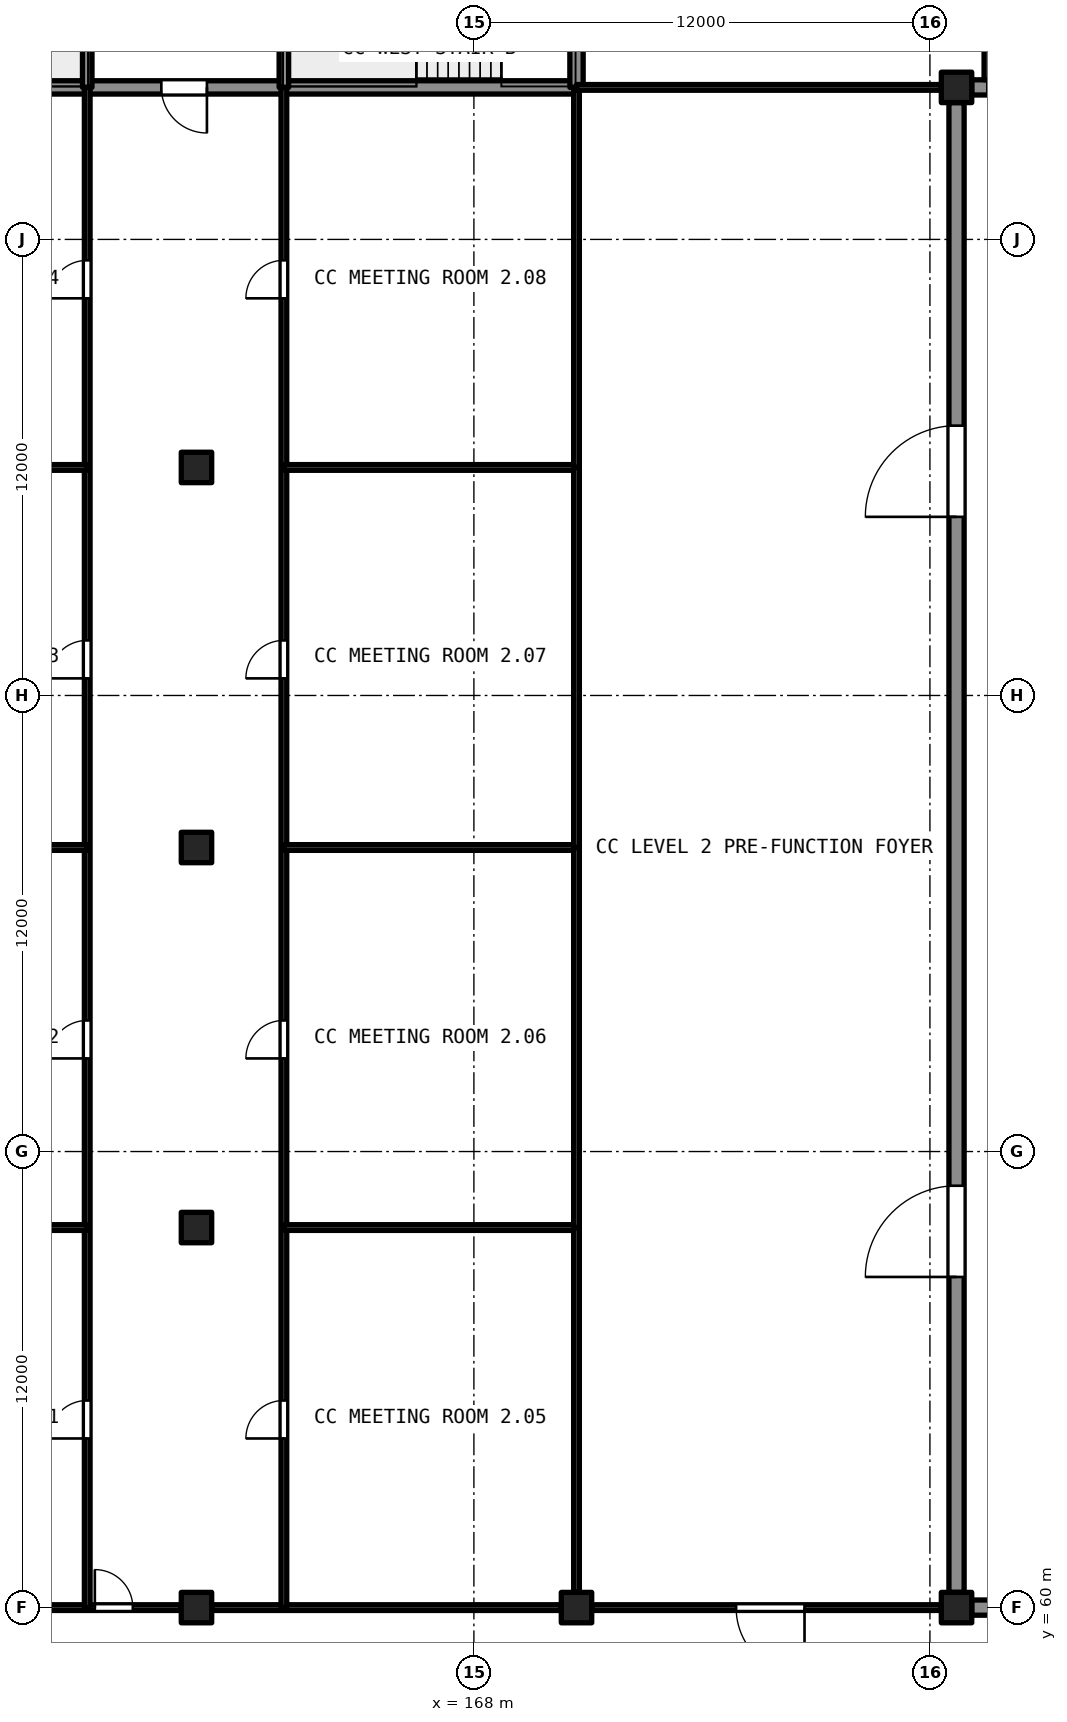
"""IFC4 building model, lengths in metres.
Left out: names, types, materials, properties, quantities, classifications, styles, units other than length and angle.
Written with IfcOpenShell. Run it as: python <this file> out.ifc"""

import sys

from ifc_helpers import new_model, si_unit, direction, frame, frame_2d, origin, origin_2d, place, context, subcontext, project, spatial, rectangle, extrude, element, fill, save


model = new_model("IFC4")
c1 = context("Model", 3, precision=1e-05, world=origin(), true_north=direction((0.0, 1.0)))
c2 = subcontext(c1, "Body", "Model", "MODEL_VIEW")
j1 = project(units=[si_unit("LENGTHUNIT", "METRE"), si_unit("PLANEANGLEUNIT", "RADIAN")], contexts=[c1])
p1 = place(None, origin())
s1 = spatial("IfcSite", under=j1, at=p1, CompositionType="ELEMENT")
p2 = place(p1, origin())
s2 = spatial("IfcBuilding", under=s1, at=p2, CompositionType="ELEMENT")
p3 = place(p2, frame((0.0, 0.0, 15.0)))
s3 = spatial("IfcBuildingStorey", under=s2, at=p3, CompositionType="ELEMENT", Elevation=15.0)
for number, where, z_axis, x_axis in (
    (1, (160.7, 60.0, 0.0), (0.0, 0.0, 1.0), (1.0, 0.0, 0.0)),
    (2, (160.7, 70.0, 0.0), (0.0, 0.0, 1.0), (1.0, 0.0, 0.0)),
    (3, (160.7, 80.0, 0.0), (0.0, 0.0, 1.0), (1.0, 0.0, 0.0)),
    (4, (160.7, 90.0, 0.0), (0.0, 0.0, 1.0), (1.0, 0.0, 0.0)),
    (5, (170.7, 60.0, 0.0), (0.0, 0.0, 1.0), (1.0, 0.0, 0.0)),
    (6, (180.7, 60.0, 0.0), (0.0, 0.0, 1.0), (1.0, 0.0, 0.0)),
    (7, (180.7, 100.0, 0.0), (0.0, 0.0, 1.0), (1.0, 0.0, 0.0)),
):
    element("IfcColumn", number, at=place(p3, frame(where, z_axis=z_axis, x_axis=x_axis)), inside=s3, PredefinedType="COLUMN", context=c2, shape_type="SweptSolid", body=[
        extrude(rectangle(XDim=0.8, YDim=0.8, at=origin_2d()), origin(), (0.0, 0.0, 1.0), 5.4),
    ])
p4 = place(p3, frame((180.7, 60.4, 0.0), z_axis=(0.0, 0.0, 1.0), x_axis=(0.0, 1.0, 0.0)))
e8 = element("IfcWall", 8, at=p4, inside=s3, PredefinedType="SHEAR", context=c2, shape_type="SweptSolid", body=[
    extrude(rectangle(XDim=39.2, YDim=0.4, at=frame_2d((19.6, 0.0))), origin(), (0.0, 0.0, 1.0), 5.4),
])
p5 = place(p4, frame((8.3, 0.0, 0.0)))
e9 = element("IfcOpeningElement", 9, at=p5, cuts=e8, PredefinedType="OPENING", context=c2, shape_type="SweptSolid", body=[
    extrude(rectangle(XDim=2.4, YDim=2.4, at=frame_2d((1.2, 1.2))), frame((0.0, 0.21, 0.0), z_axis=(0.0, -1.0, 0.0), x_axis=(1.0, 0.0, 0.0)), (0.0, 0.0, 1.0), 0.421),
])
p6 = place(p4, frame((28.3, 0.0, 0.0)))
e10 = element("IfcOpeningElement", 10, at=p6, cuts=e8, PredefinedType="OPENING", context=c2, shape_type="SweptSolid", body=[
    extrude(rectangle(XDim=2.4, YDim=2.4, at=frame_2d((1.2, 1.2))), frame((0.0, 0.21, 0.0), z_axis=(0.0, -1.0, 0.0), x_axis=(1.0, 0.0, 0.0)), (0.0, 0.0, 1.0), 0.421),
])
p7 = place(p3, frame((181.1, 60.0, 0.0), z_axis=(0.0, 0.0, 1.0), x_axis=(1.0, 0.0, 0.0)))
e11 = element("IfcWall", 11, at=p7, inside=s3, PredefinedType="SHEAR", context=c2, shape_type="SweptSolid", body=[
    extrude(rectangle(XDim=9.2, YDim=0.4, at=frame_2d((4.6, 0.0))), origin(), (0.0, 0.0, 1.0), 5.4),
])
p8 = place(p3, frame((181.1, 100.0, 0.0), z_axis=(0.0, 0.0, 1.0), x_axis=(1.0, 0.0, 0.0)))
e12 = element("IfcWall", 12, at=p8, inside=s3, PredefinedType="SHEAR", context=c2, shape_type="SweptSolid", body=[
    extrude(rectangle(XDim=0.45, YDim=0.4, at=frame_2d((0.225, 0.0))), origin(), (0.0, 0.0, 1.0), 5.4),
])
p9 = place(p3, frame((150.3, 100.0, 0.0), z_axis=(0.0, 0.0, 1.0), x_axis=(1.0, 0.0, 0.0)))
e13 = element("IfcWall", 13, at=p9, inside=s3, PredefinedType="SHEAR", context=c2, shape_type="SweptSolid", body=[
    extrude(rectangle(XDim=7.525, YDim=0.35, at=frame_2d((3.762, 0.0))), origin(), (0.0, 0.0, 1.0), 4.99),
])
p10 = place(p3, frame((163.0, 100.0, 0.0), z_axis=(0.0, 0.0, 1.0), x_axis=(-1.0, 0.0, 0.0)))
e14 = element("IfcWall", 14, at=p10, inside=s3, PredefinedType="SHEAR", context=c2, shape_type="SweptSolid", body=[
    extrude(rectangle(XDim=5.175, YDim=0.35, at=frame_2d((2.587, 0.0))), origin(), (0.0, 0.0, 1.0), 4.99),
])
p11 = place(p10, frame((2.025, 0.0, 0.0)))
e15 = element("IfcOpeningElement", 15, at=p11, cuts=e14, PredefinedType="OPENING", context=c2, shape_type="SweptSolid", body=[
    extrude(rectangle(XDim=1.2, YDim=2.1, at=frame_2d((0.6, 1.05))), frame((0.0, 0.186, 0.0), z_axis=(0.0, -1.0, 0.0), x_axis=(1.0, 0.0, 0.0)), (0.0, 0.0, 1.0), 0.371),
])
p12 = place(p3, frame((163.0, 100.0, 0.0), z_axis=(0.0, 0.0, 1.0), x_axis=(1.0, 0.0, 0.0)))
e16 = element("IfcWall", 16, at=p12, inside=s3, PredefinedType="SHEAR", context=c2, shape_type="SweptSolid", body=[
    extrude(rectangle(XDim=7.7, YDim=0.35, at=frame_2d((3.85, 0.0))), origin(), (0.0, 0.0, 1.0), 4.99),
])
p13 = place(p3, frame((170.7, 100.0, 0.0), z_axis=(0.0, 0.0, 1.0), x_axis=(0.0, 1.0, 0.0)))
e17 = element("IfcWall", 17, at=p13, inside=s3, PredefinedType="SHEAR", context=c2, shape_type="SweptSolid", body=[
    extrude(rectangle(XDim=3.15, YDim=0.35, at=frame_2d((1.575, 0.0))), origin(), (0.0, 0.0, 1.0), 4.99),
])
for number, where, z_axis, x_axis in (
    (18, (157.825, 100.0, 0.0), (0.0, 0.0, 1.0), (0.0, 1.0, 0.0)),
    (19, (163.0, 100.0, 0.0), (0.0, 0.0, 1.0), (0.0, 1.0, 0.0)),
):
    element("IfcWall", number, at=place(p3, frame(where, z_axis=z_axis, x_axis=x_axis)), inside=s3, PredefinedType="SHEAR", context=c2, shape_type="SweptSolid", body=[
        extrude(rectangle(XDim=3.15, YDim=0.25, at=frame_2d((1.575, 0.0))), origin(), (0.0, 0.0, 1.0), 4.99),
    ])
p14 = place(p3, frame((160.3, 60.0, 0.0), z_axis=(0.0, 0.0, 1.0), x_axis=(-1.0, 0.0, 0.0)))
e20 = element("IfcWall", 20, at=p14, inside=s3, PredefinedType="PARTITIONING", context=c2, shape_type="SweptSolid", body=[
    extrude(rectangle(XDim=9.2, YDim=0.15, at=frame_2d((4.6, 0.0))), origin(), (0.0, 0.0, 1.0), 4.99),
])
p15 = place(p14, frame((1.275, 0.0, 0.0)))
e21 = element("IfcOpeningElement", 21, at=p15, cuts=e20, PredefinedType="OPENING", context=c2, shape_type="SweptSolid", body=[
    extrude(rectangle(XDim=1.0, YDim=2.1, at=frame_2d((0.5, 1.05))), frame((0.0, 0.085, 0.0), z_axis=(0.0, -1.0, 0.0), x_axis=(1.0, 0.0, 0.0)), (0.0, 0.0, 1.0), 0.171),
])
p16 = place(p3, frame((161.1, 60.0, 0.0), z_axis=(0.0, 0.0, 1.0), x_axis=(1.0, 0.0, 0.0)))
e22 = element("IfcWall", 22, at=p16, inside=s3, PredefinedType="PARTITIONING", context=c2, shape_type="SweptSolid", body=[
    extrude(rectangle(XDim=9.2, YDim=0.15, at=frame_2d((4.6, 0.0))), origin(), (0.0, 0.0, 1.0), 4.99),
])
p17 = place(p3, frame((180.3, 60.0, 0.0), z_axis=(0.0, 0.0, 1.0), x_axis=(-1.0, 0.0, 0.0)))
e23 = element("IfcWall", 23, at=p17, inside=s3, PredefinedType="PARTITIONING", context=c2, shape_type="SweptSolid", body=[
    extrude(rectangle(XDim=9.2, YDim=0.15, at=frame_2d((4.6, 0.0))), origin(), (0.0, 0.0, 1.0), 4.99),
])
p18 = place(p17, frame((3.6, 0.0, 0.0)))
e24 = element("IfcOpeningElement", 24, at=p18, cuts=e23, PredefinedType="OPENING", context=c2, shape_type="SweptSolid", body=[
    extrude(rectangle(XDim=1.8, YDim=2.1, at=frame_2d((0.9, 1.05))), frame((0.0, 0.085, 0.0), z_axis=(0.0, -1.0, 0.0), x_axis=(1.0, 0.0, 0.0)), (0.0, 0.0, 1.0), 0.171),
])
p19 = place(p3, frame((157.825, 100.0, 0.0), z_axis=(0.0, 0.0, 1.0), x_axis=(0.0, -1.0, 0.0)))
e25 = element("IfcWall", 25, at=p19, inside=s3, PredefinedType="PARTITIONING", context=c2, shape_type="SweptSolid", body=[
    extrude(rectangle(XDim=40.0, YDim=0.15, at=frame_2d((20.0, 0.0))), origin(), (0.0, 0.0, 1.0), 4.99),
])
p20 = place(p19, frame((34.55, 0.0, 0.0)))
e26 = element("IfcOpeningElement", 26, at=p20, cuts=e25, PredefinedType="OPENING", context=c2, shape_type="SweptSolid", body=[
    extrude(rectangle(XDim=1.0, YDim=2.1, at=frame_2d((0.5, 1.05))), frame((0.0, 0.085, 0.0), z_axis=(0.0, -1.0, 0.0), x_axis=(1.0, 0.0, 0.0)), (0.0, 0.0, 1.0), 0.171),
])
p21 = place(p19, frame((24.55, 0.0, 0.0)))
e27 = element("IfcOpeningElement", 27, at=p21, cuts=e25, PredefinedType="OPENING", context=c2, shape_type="SweptSolid", body=[
    extrude(rectangle(XDim=1.0, YDim=2.1, at=frame_2d((0.5, 1.05))), frame((0.0, 0.085, 0.0), z_axis=(0.0, -1.0, 0.0), x_axis=(1.0, 0.0, 0.0)), (0.0, 0.0, 1.0), 0.171),
])
p22 = place(p19, frame((14.55, 0.0, 0.0)))
e28 = element("IfcOpeningElement", 28, at=p22, cuts=e25, PredefinedType="OPENING", context=c2, shape_type="SweptSolid", body=[
    extrude(rectangle(XDim=1.0, YDim=2.1, at=frame_2d((0.5, 1.05))), frame((0.0, 0.085, 0.0), z_axis=(0.0, -1.0, 0.0), x_axis=(1.0, 0.0, 0.0)), (0.0, 0.0, 1.0), 0.171),
])
p23 = place(p19, frame((4.55, 0.0, 0.0)))
e29 = element("IfcOpeningElement", 29, at=p23, cuts=e25, PredefinedType="OPENING", context=c2, shape_type="SweptSolid", body=[
    extrude(rectangle(XDim=1.0, YDim=2.1, at=frame_2d((0.5, 1.05))), frame((0.0, 0.085, 0.0), z_axis=(0.0, -1.0, 0.0), x_axis=(1.0, 0.0, 0.0)), (0.0, 0.0, 1.0), 0.171),
])
p24 = place(p3, frame((163.0, 60.0, 0.0), z_axis=(0.0, 0.0, 1.0), x_axis=(0.0, 1.0, 0.0)))
e30 = element("IfcWall", 30, at=p24, inside=s3, PredefinedType="PARTITIONING", context=c2, shape_type="SweptSolid", body=[
    extrude(rectangle(XDim=40.0, YDim=0.15, at=frame_2d((20.0, 0.0))), origin(), (0.0, 0.0, 1.0), 4.99),
])
p25 = place(p24, frame((4.45, 0.0, 0.0)))
e31 = element("IfcOpeningElement", 31, at=p25, cuts=e30, PredefinedType="OPENING", context=c2, shape_type="SweptSolid", body=[
    extrude(rectangle(XDim=1.0, YDim=2.1, at=frame_2d((0.5, 1.05))), frame((0.0, 0.085, 0.0), z_axis=(0.0, -1.0, 0.0), x_axis=(1.0, 0.0, 0.0)), (0.0, 0.0, 1.0), 0.171),
])
p26 = place(p24, frame((14.45, 0.0, 0.0)))
e32 = element("IfcOpeningElement", 32, at=p26, cuts=e30, PredefinedType="OPENING", context=c2, shape_type="SweptSolid", body=[
    extrude(rectangle(XDim=1.0, YDim=2.1, at=frame_2d((0.5, 1.05))), frame((0.0, 0.085, 0.0), z_axis=(0.0, -1.0, 0.0), x_axis=(1.0, 0.0, 0.0)), (0.0, 0.0, 1.0), 0.171),
])
p27 = place(p24, frame((24.45, 0.0, 0.0)))
e33 = element("IfcOpeningElement", 33, at=p27, cuts=e30, PredefinedType="OPENING", context=c2, shape_type="SweptSolid", body=[
    extrude(rectangle(XDim=1.0, YDim=2.1, at=frame_2d((0.5, 1.05))), frame((0.0, 0.085, 0.0), z_axis=(0.0, -1.0, 0.0), x_axis=(1.0, 0.0, 0.0)), (0.0, 0.0, 1.0), 0.171),
])
p28 = place(p24, frame((34.45, 0.0, 0.0)))
e34 = element("IfcOpeningElement", 34, at=p28, cuts=e30, PredefinedType="OPENING", context=c2, shape_type="SweptSolid", body=[
    extrude(rectangle(XDim=1.0, YDim=2.1, at=frame_2d((0.5, 1.05))), frame((0.0, 0.085, 0.0), z_axis=(0.0, -1.0, 0.0), x_axis=(1.0, 0.0, 0.0)), (0.0, 0.0, 1.0), 0.171),
])
p29 = place(p3, frame((151.1, 70.0, 0.0), z_axis=(0.0, 0.0, 1.0), x_axis=(1.0, 0.0, 0.0)))
e35 = element("IfcWall", 35, at=p29, inside=s3, PredefinedType="PARTITIONING", context=c2, shape_type="SweptSolid", body=[
    extrude(rectangle(XDim=6.725, YDim=0.15, at=frame_2d((3.362, 0.0))), origin(), (0.0, 0.0, 1.0), 4.99),
])
p30 = place(p3, frame((163.0, 70.0, 0.0), z_axis=(0.0, 0.0, 1.0), x_axis=(1.0, 0.0, 0.0)))
e36 = element("IfcWall", 36, at=p30, inside=s3, PredefinedType="PARTITIONING", context=c2, shape_type="SweptSolid", body=[
    extrude(rectangle(XDim=7.7, YDim=0.15, at=frame_2d((3.85, 0.0))), origin(), (0.0, 0.0, 1.0), 4.99),
])
p31 = place(p3, frame((170.7, 60.4, 0.0), z_axis=(0.0, 0.0, 1.0), x_axis=(0.0, 1.0, 0.0)))
e37 = element("IfcWall", 37, at=p31, inside=s3, PredefinedType="PARTITIONING", context=c2, shape_type="SweptSolid", body=[
    extrude(rectangle(XDim=9.6, YDim=0.15, at=frame_2d((4.8, 0.0))), origin(), (0.0, 0.0, 1.0), 4.99),
])
p32 = place(p3, frame((151.1, 80.0, 0.0), z_axis=(0.0, 0.0, 1.0), x_axis=(1.0, 0.0, 0.0)))
e38 = element("IfcWall", 38, at=p32, inside=s3, PredefinedType="PARTITIONING", context=c2, shape_type="SweptSolid", body=[
    extrude(rectangle(XDim=6.725, YDim=0.15, at=frame_2d((3.362, 0.0))), origin(), (0.0, 0.0, 1.0), 4.99),
])
p33 = place(p3, frame((163.0, 80.0, 0.0), z_axis=(0.0, 0.0, 1.0), x_axis=(1.0, 0.0, 0.0)))
e39 = element("IfcWall", 39, at=p33, inside=s3, PredefinedType="PARTITIONING", context=c2, shape_type="SweptSolid", body=[
    extrude(rectangle(XDim=7.7, YDim=0.15, at=frame_2d((3.85, 0.0))), origin(), (0.0, 0.0, 1.0), 4.99),
])
p34 = place(p3, frame((170.7, 70.0, 0.0), z_axis=(0.0, 0.0, 1.0), x_axis=(0.0, 1.0, 0.0)))
e40 = element("IfcWall", 40, at=p34, inside=s3, PredefinedType="PARTITIONING", context=c2, shape_type="SweptSolid", body=[
    extrude(rectangle(XDim=10.0, YDim=0.15, at=frame_2d((5.0, 0.0))), origin(), (0.0, 0.0, 1.0), 4.99),
])
p35 = place(p3, frame((151.1, 90.0, 0.0), z_axis=(0.0, 0.0, 1.0), x_axis=(1.0, 0.0, 0.0)))
e41 = element("IfcWall", 41, at=p35, inside=s3, PredefinedType="PARTITIONING", context=c2, shape_type="SweptSolid", body=[
    extrude(rectangle(XDim=6.725, YDim=0.15, at=frame_2d((3.362, 0.0))), origin(), (0.0, 0.0, 1.0), 4.99),
])
p36 = place(p3, frame((163.0, 90.0, 0.0), z_axis=(0.0, 0.0, 1.0), x_axis=(1.0, 0.0, 0.0)))
e42 = element("IfcWall", 42, at=p36, inside=s3, PredefinedType="PARTITIONING", context=c2, shape_type="SweptSolid", body=[
    extrude(rectangle(XDim=7.7, YDim=0.15, at=frame_2d((3.85, 0.0))), origin(), (0.0, 0.0, 1.0), 4.99),
])
for number, where, z_axis, x_axis in (
    (43, (170.7, 80.0, 0.0), (0.0, 0.0, 1.0), (0.0, 1.0, 0.0)),
    (44, (170.7, 90.0, 0.0), (0.0, 0.0, 1.0), (0.0, 1.0, 0.0)),
):
    element("IfcWall", number, at=place(p3, frame(where, z_axis=z_axis, x_axis=x_axis)), inside=s3, PredefinedType="PARTITIONING", context=c2, shape_type="SweptSolid", body=[
        extrude(rectangle(XDim=10.0, YDim=0.15, at=frame_2d((5.0, 0.0))), origin(), (0.0, 0.0, 1.0), 4.99),
    ])
p37 = place(p3, frame((170.7, 100.0, 0.0), z_axis=(0.0, 0.0, 1.0), x_axis=(1.0, 0.0, 0.0)))
e45 = element("IfcWall", 45, at=p37, inside=s3, PredefinedType="PARTITIONING", context=c2, shape_type="SweptSolid", body=[
    extrude(rectangle(XDim=9.6, YDim=0.15, at=frame_2d((4.8, 0.0))), origin(), (0.0, 0.0, 1.0), 4.99),
])
p38 = place(p3, frame((181.55, 100.2, 0.0), z_axis=(0.0, 0.0, 1.0), x_axis=(0.0, 1.0, 0.0)))
e46 = element("IfcWall", 46, at=p38, inside=s3, PredefinedType="SHEAR", context=c2, shape_type="SweptSolid", body=[
    extrude(rectangle(XDim=4.525, YDim=0.25, at=frame_2d((2.263, 0.0))), origin(), (0.0, 0.0, 1.0), 4.99),
])
p39 = place(p15, origin())
e47 = element("IfcDoor", 47, at=p39, inside=s3, OperationType="SINGLE_SWING_RIGHT", PredefinedType="DOOR", context=c2, shape_type="SweptSolid", body=[
    extrude(rectangle(XDim=1.0, YDim=2.1, at=frame_2d((0.5, 1.05))), frame((0.0, 0.025, 0.0), z_axis=(0.0, -1.0, 0.0), x_axis=(1.0, 0.0, 0.0)), (0.0, 0.0, 1.0), 0.05),
])
fill(e21, e47)
p40 = place(p11, origin())
e48 = element("IfcDoor", 48, at=p40, inside=s3, OperationType="SINGLE_SWING_LEFT", PredefinedType="DOOR", context=c2, shape_type="SweptSolid", body=[
    extrude(rectangle(XDim=1.2, YDim=2.1, at=frame_2d((0.6, 1.05))), frame((0.0, 0.025, 0.0), z_axis=(0.0, -1.0, 0.0), x_axis=(1.0, 0.0, 0.0)), (0.0, 0.0, 1.0), 0.05),
])
fill(e15, e48)
p41 = place(p20, origin())
e49 = element("IfcDoor", 49, at=p41, inside=s3, OperationType="SINGLE_SWING_RIGHT", PredefinedType="DOOR", context=c2, shape_type="SweptSolid", body=[
    extrude(rectangle(XDim=1.0, YDim=2.1, at=frame_2d((0.5, 1.05))), frame((0.0, 0.025, 0.0), z_axis=(0.0, -1.0, 0.0), x_axis=(1.0, 0.0, 0.0)), (0.0, 0.0, 1.0), 0.05),
])
fill(e26, e49)
p42 = place(p25, origin())
e50 = element("IfcDoor", 50, at=p42, inside=s3, OperationType="SINGLE_SWING_LEFT", PredefinedType="DOOR", context=c2, shape_type="SweptSolid", body=[
    extrude(rectangle(XDim=1.0, YDim=2.1, at=frame_2d((0.5, 1.05))), frame((0.0, 0.025, 0.0), z_axis=(0.0, -1.0, 0.0), x_axis=(1.0, 0.0, 0.0)), (0.0, 0.0, 1.0), 0.05),
])
fill(e31, e50)
p43 = place(p21, origin())
e51 = element("IfcDoor", 51, at=p43, inside=s3, OperationType="SINGLE_SWING_RIGHT", PredefinedType="DOOR", context=c2, shape_type="SweptSolid", body=[
    extrude(rectangle(XDim=1.0, YDim=2.1, at=frame_2d((0.5, 1.05))), frame((0.0, 0.025, 0.0), z_axis=(0.0, -1.0, 0.0), x_axis=(1.0, 0.0, 0.0)), (0.0, 0.0, 1.0), 0.05),
])
fill(e27, e51)
p44 = place(p26, origin())
e52 = element("IfcDoor", 52, at=p44, inside=s3, OperationType="SINGLE_SWING_LEFT", PredefinedType="DOOR", context=c2, shape_type="SweptSolid", body=[
    extrude(rectangle(XDim=1.0, YDim=2.1, at=frame_2d((0.5, 1.05))), frame((0.0, 0.025, 0.0), z_axis=(0.0, -1.0, 0.0), x_axis=(1.0, 0.0, 0.0)), (0.0, 0.0, 1.0), 0.05),
])
fill(e32, e52)
p45 = place(p22, origin())
e53 = element("IfcDoor", 53, at=p45, inside=s3, OperationType="SINGLE_SWING_RIGHT", PredefinedType="DOOR", context=c2, shape_type="SweptSolid", body=[
    extrude(rectangle(XDim=1.0, YDim=2.1, at=frame_2d((0.5, 1.05))), frame((0.0, 0.025, 0.0), z_axis=(0.0, -1.0, 0.0), x_axis=(1.0, 0.0, 0.0)), (0.0, 0.0, 1.0), 0.05),
])
fill(e28, e53)
p46 = place(p27, origin())
e54 = element("IfcDoor", 54, at=p46, inside=s3, OperationType="SINGLE_SWING_LEFT", PredefinedType="DOOR", context=c2, shape_type="SweptSolid", body=[
    extrude(rectangle(XDim=1.0, YDim=2.1, at=frame_2d((0.5, 1.05))), frame((0.0, 0.025, 0.0), z_axis=(0.0, -1.0, 0.0), x_axis=(1.0, 0.0, 0.0)), (0.0, 0.0, 1.0), 0.05),
])
fill(e33, e54)
p47 = place(p23, origin())
e55 = element("IfcDoor", 55, at=p47, inside=s3, OperationType="SINGLE_SWING_RIGHT", PredefinedType="DOOR", context=c2, shape_type="SweptSolid", body=[
    extrude(rectangle(XDim=1.0, YDim=2.1, at=frame_2d((0.5, 1.05))), frame((0.0, 0.025, 0.0), z_axis=(0.0, -1.0, 0.0), x_axis=(1.0, 0.0, 0.0)), (0.0, 0.0, 1.0), 0.05),
])
fill(e29, e55)
p48 = place(p28, origin())
e56 = element("IfcDoor", 56, at=p48, inside=s3, OperationType="SINGLE_SWING_LEFT", PredefinedType="DOOR", context=c2, shape_type="SweptSolid", body=[
    extrude(rectangle(XDim=1.0, YDim=2.1, at=frame_2d((0.5, 1.05))), frame((0.0, 0.025, 0.0), z_axis=(0.0, -1.0, 0.0), x_axis=(1.0, 0.0, 0.0)), (0.0, 0.0, 1.0), 0.05),
])
fill(e34, e56)
p49 = place(p18, origin())
e57 = element("IfcDoor", 57, at=p49, inside=s3, OperationType="DOUBLE_DOOR_SINGLE_SWING", PredefinedType="DOOR", context=c2, shape_type="SweptSolid", body=[
    extrude(rectangle(XDim=1.8, YDim=2.1, at=frame_2d((0.9, 1.05))), frame((0.0, 0.025, 0.0), z_axis=(0.0, -1.0, 0.0), x_axis=(1.0, 0.0, 0.0)), (0.0, 0.0, 1.0), 0.05),
])
fill(e24, e57)
p50 = place(p5, origin())
e58 = element("IfcDoor", 58, at=p50, inside=s3, OperationType="DOUBLE_DOOR_SINGLE_SWING", PredefinedType="DOOR", context=c2, shape_type="SweptSolid", body=[
    extrude(rectangle(XDim=2.4, YDim=2.4, at=frame_2d((1.2, 1.2))), frame((0.0, 0.025, 0.0), z_axis=(0.0, -1.0, 0.0), x_axis=(1.0, 0.0, 0.0)), (0.0, 0.0, 1.0), 0.05),
])
fill(e9, e58)
p51 = place(p6, origin())
e59 = element("IfcDoor", 59, at=p51, inside=s3, OperationType="DOUBLE_DOOR_SINGLE_SWING", PredefinedType="DOOR", context=c2, shape_type="SweptSolid", body=[
    extrude(rectangle(XDim=2.4, YDim=2.4, at=frame_2d((1.2, 1.2))), frame((0.0, 0.025, 0.0), z_axis=(0.0, -1.0, 0.0), x_axis=(1.0, 0.0, 0.0)), (0.0, 0.0, 1.0), 0.05),
])
fill(e10, e59)
save(model, sys.argv[1])
